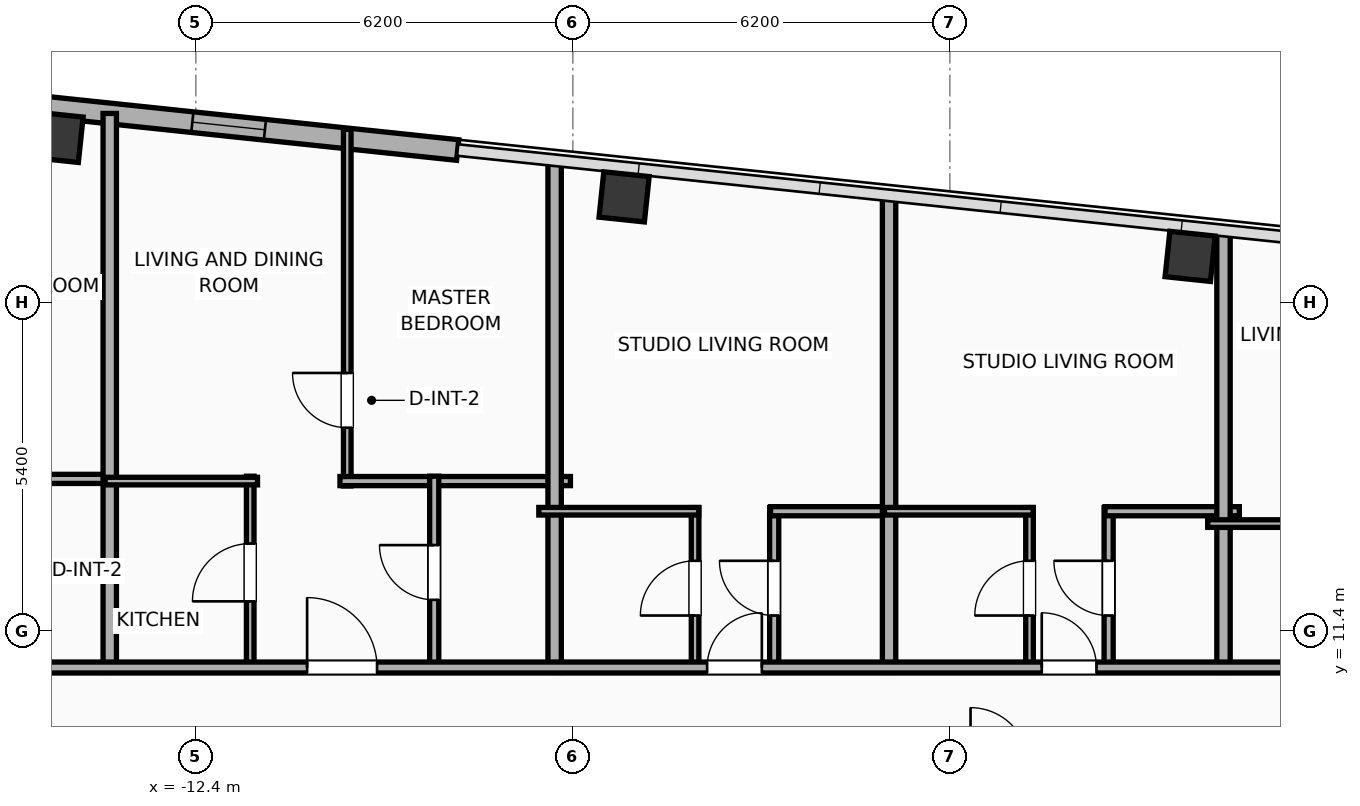
"""IFC4 building model, lengths in metres.
Left out: names, types, materials, properties, quantities, classifications, styles, units other than length and angle.
Written with IfcOpenShell. Run it as: python <this file> out.ifc"""

import sys

from ifc_helpers import new_model, si_unit, direction, frame, frame_2d, origin, origin_2d, place, context, subcontext, project, spatial, rectangle, hollow_rectangle, extrude, element, fill, save


model = new_model("IFC4")
c1 = context("Model", 3, precision=1e-05, world=origin(), true_north=direction((0.0, 1.0)))
c2 = subcontext(c1, "Body", "Model", "MODEL_VIEW")
j1 = project(units=[si_unit("LENGTHUNIT", "METRE"), si_unit("PLANEANGLEUNIT", "RADIAN")], contexts=[c1])
p1 = place(None, origin())
s1 = spatial("IfcSite", under=j1, at=p1, CompositionType="ELEMENT")
p2 = place(p1, origin())
s2 = spatial("IfcBuilding", under=s1, at=p2, CompositionType="ELEMENT")
p3 = place(p2, frame((0.0, 0.0, 275.6)))
s3 = spatial("IfcBuildingStorey", under=s2, at=p3, CompositionType="ELEMENT", Elevation=275.6)
for number, where, z_axis, x_axis in (
    (1, (3.952, 17.561, 0.0), (0.0, 0.0, 1.0), (0.995, -0.105, 0.0)),
    (2, (-5.357, 18.54, 0.0), (0.0, 0.0, 1.0), (0.995, -0.105, 0.0)),
    (3, (-14.666, 19.518, 0.0), (0.0, 0.0, 1.0), (0.995, -0.105, 0.0)),
):
    element("IfcColumn", number, at=place(p3, frame(where, z_axis=z_axis, x_axis=x_axis)), inside=s3, PredefinedType="COLUMN", context=c2, shape_type="SweptSolid", body=[
        extrude(hollow_rectangle(XDim=0.75, YDim=0.75, WallThickness=0.025, at=origin_2d()), origin(), (0.0, 0.0, 1.0), 3.9),
    ])
p4 = place(p3, frame((-23.908, 20.972, 0.0), z_axis=(0.0, 0.0, 1.0), x_axis=(0.994521594531, -0.104531325504, 0.0)))
e4 = element("IfcWall", 4, at=p4, inside=s3, PredefinedType="ELEMENTEDWALL", context=c2, shape_type="SweptSolid", body=[
    extrude(rectangle(XDim=15.901, YDim=0.34, at=frame_2d((7.95, 0.0))), origin(), (0.0, 0.0, 1.0), 3.65),
])
p5 = place(p4, frame((1.243, 0.0, 0.75)))
e5 = element("IfcOpeningElement", 5, at=p5, cuts=e4, PredefinedType="OPENING", context=c2, shape_type="SweptSolid", body=[
    extrude(rectangle(XDim=1.2, YDim=2.05, at=frame_2d((0.6, 1.025))), frame((0.0, 0.18, 0.0), z_axis=(0.0, -1.0, 0.0), x_axis=(1.0, 0.0, 0.0)), (0.0, 0.0, 1.0), 0.36),
])
p6 = place(p4, frame((4.157, 0.0, 0.75)))
e6 = element("IfcOpeningElement", 6, at=p6, cuts=e4, PredefinedType="OPENING", context=c2, shape_type="SweptSolid", body=[
    extrude(rectangle(XDim=1.2, YDim=2.05, at=frame_2d((0.6, 1.025))), frame((0.0, 0.18, 0.0), z_axis=(0.0, -1.0, 0.0), x_axis=(1.0, 0.0, 0.0)), (0.0, 0.0, 1.0), 0.36),
])
p7 = place(p4, frame((7.475, 0.0, 0.75)))
e7 = element("IfcOpeningElement", 7, at=p7, cuts=e4, PredefinedType="OPENING", context=c2, shape_type="SweptSolid", body=[
    extrude(rectangle(XDim=1.2, YDim=2.05, at=frame_2d((0.6, 1.025))), frame((0.0, 0.18, 0.0), z_axis=(0.0, -1.0, 0.0), x_axis=(1.0, 0.0, 0.0)), (0.0, 0.0, 1.0), 0.36),
])
p8 = place(p4, frame((11.513, 0.0, 0.75)))
e8 = element("IfcOpeningElement", 8, at=p8, cuts=e4, PredefinedType="OPENING", context=c2, shape_type="SweptSolid", body=[
    extrude(rectangle(XDim=1.2, YDim=2.05, at=frame_2d((0.6, 1.025))), frame((0.0, 0.18, 0.0), z_axis=(0.0, -1.0, 0.0), x_axis=(1.0, 0.0, 0.0)), (0.0, 0.0, 1.0), 0.36),
])
p9 = place(p3, frame((-17.346, 13.902, 0.0), z_axis=(0.0, 0.0, 1.0), x_axis=(1.0, 0.0, 0.0)))
e9 = element("IfcWall", 9, at=p9, inside=s3, PredefinedType="PLUMBINGWALL", context=c2, shape_type="SweptSolid", body=[
    extrude(rectangle(XDim=3.605, YDim=0.15, at=frame_2d((1.802, 0.0))), origin(), (0.0, 0.0, 1.0), 3.65),
])
p10 = place(p3, frame((-13.816, 10.72, 0.0), z_axis=(0.0, 0.0, 1.0), x_axis=(0.0, 1.0, 0.0)))
e10 = element("IfcWall", 10, at=p10, inside=s3, PredefinedType="PARTITIONING", context=c2, shape_type="SweptSolid", body=[
    extrude(rectangle(XDim=9.192, YDim=0.22, at=frame_2d((4.596, 0.0))), origin(), (0.0, 0.0, 1.0), 3.65),
])
p11 = place(p3, frame((-9.91, 13.786, 0.0), z_axis=(0.0, 0.0, 1.0), x_axis=(0.0, 1.0, 0.0)))
e11 = element("IfcWall", 11, at=p11, inside=s3, PredefinedType="PARTITIONING", context=c2, shape_type="SweptSolid", body=[
    extrude(rectangle(XDim=5.866, YDim=0.125, at=frame_2d((2.933, 0.0))), origin(), (0.0, 0.0, 1.0), 3.65),
])
p12 = place(p11, frame((0.958, 0.0, 0.0)))
e12 = element("IfcOpeningElement", 12, at=p12, cuts=e11, PredefinedType="OPENING", context=c2, shape_type="SweptSolid", body=[
    extrude(rectangle(XDim=0.9, YDim=2.05, at=frame_2d((0.45, 1.025))), frame((0.0, 0.073, 0.0), z_axis=(0.0, -1.0, 0.0), x_axis=(1.0, 0.0, 0.0)), (0.0, 0.0, 1.0), 0.145),
])
p13 = place(p3, frame((-10.03, 13.866, 0.0), z_axis=(0.0, 0.0, 1.0), x_axis=(1.0, 0.0, 0.0)))
e13 = element("IfcWall", 13, at=p13, inside=s3, PredefinedType="PLUMBINGWALL", context=c2, shape_type="SweptSolid", body=[
    extrude(rectangle(XDim=3.79, YDim=0.15, at=frame_2d((1.895, 0.0))), origin(), (0.0, 0.0, 1.0), 3.65),
])
p14 = place(p3, frame((-11.506, 10.78, 0.0), z_axis=(0.0, 0.0, 1.0), x_axis=(0.0, 1.0, 0.0)))
e14 = element("IfcWall", 14, at=p14, inside=s3, PredefinedType="PARTITIONING", context=c2, shape_type="SweptSolid", body=[
    extrude(rectangle(XDim=3.166, YDim=0.125, at=frame_2d((1.583, 0.0))), origin(), (0.0, 0.0, 1.0), 3.65),
])
p15 = place(p14, frame((1.108, 0.0, 0.0)))
e15 = element("IfcOpeningElement", 15, at=p15, cuts=e14, PredefinedType="OPENING", context=c2, shape_type="SweptSolid", body=[
    extrude(rectangle(XDim=0.95, YDim=2.05, at=frame_2d((0.475, 1.025))), frame((0.0, 0.073, 0.0), z_axis=(0.0, -1.0, 0.0), x_axis=(1.0, 0.0, 0.0)), (0.0, 0.0, 1.0), 0.145),
])
p16 = place(p3, frame((-13.891, 13.866, 0.0), z_axis=(0.0, 0.0, 1.0), x_axis=(1.0, 0.0, 0.0)))
e16 = element("IfcWall", 16, at=p16, inside=s3, PredefinedType="PARTITIONING", context=c2, shape_type="SweptSolid", body=[
    extrude(rectangle(XDim=2.505, YDim=0.125, at=frame_2d((1.252, 0.0))), origin(), (0.0, 0.0, 1.0), 3.65),
])
p17 = place(p3, frame((-8.48, 10.78, 0.0), z_axis=(0.0, 0.0, 1.0), x_axis=(0.0, 1.0, 0.0)))
e17 = element("IfcWall", 17, at=p17, inside=s3, PredefinedType="PLUMBINGWALL", context=c2, shape_type="SweptSolid", body=[
    extrude(rectangle(XDim=3.166, YDim=0.15, at=frame_2d((1.583, 0.0))), origin(), (0.0, 0.0, 1.0), 3.65),
])
p18 = place(p17, frame((1.133, 0.0, 0.0)))
e18 = element("IfcOpeningElement", 18, at=p18, cuts=e17, PredefinedType="OPENING", context=c2, shape_type="SweptSolid", body=[
    extrude(rectangle(XDim=0.9, YDim=2.05, at=frame_2d((0.45, 1.025))), frame((0.0, 0.085, 0.0), z_axis=(0.0, -1.0, 0.0), x_axis=(1.0, 0.0, 0.0)), (0.0, 0.0, 1.0), 0.17),
])
p19 = place(p3, frame((-6.5, 10.72, 0.0), z_axis=(0.0, 0.0, 1.0), x_axis=(0.0, 1.0, 0.0)))
e19 = element("IfcWall", 19, at=p19, inside=s3, PredefinedType="PARTITIONING", context=c2, shape_type="SweptSolid", body=[
    extrude(rectangle(XDim=8.423, YDim=0.22, at=frame_2d((4.211, 0.0))), origin(), (0.0, 0.0, 1.0), 3.65),
])
p20 = place(p3, frame((-4.19, 10.78, 0.0), z_axis=(0.0, 0.0, 1.0), x_axis=(0.0, 1.0, 0.0)))
e20 = element("IfcWall", 20, at=p20, inside=s3, PredefinedType="PARTITIONING", context=c2, shape_type="SweptSolid", body=[
    extrude(rectangle(XDim=2.65, YDim=0.125, at=frame_2d((1.325, 0.0))), origin(), (0.0, 0.0, 1.0), 3.65),
])
p21 = place(p20, frame((0.875, 0.0, 0.0)))
e21 = element("IfcOpeningElement", 21, at=p21, cuts=e20, PredefinedType="OPENING", context=c2, shape_type="SweptSolid", body=[
    extrude(rectangle(XDim=0.9, YDim=2.05, at=frame_2d((0.45, 1.025))), frame((0.0, 0.073, 0.0), z_axis=(0.0, -1.0, 0.0), x_axis=(1.0, 0.0, 0.0)), (0.0, 0.0, 1.0), 0.145),
])
p22 = place(p3, frame((-2.889, 10.78, 0.0), z_axis=(0.0, 0.0, 1.0), x_axis=(0.0, 1.0, 0.0)))
e22 = element("IfcWall", 22, at=p22, inside=s3, PredefinedType="PLUMBINGWALL", context=c2, shape_type="SweptSolid", body=[
    extrude(rectangle(XDim=2.65, YDim=0.15, at=frame_2d((1.325, 0.0))), origin(), (0.0, 0.0, 1.0), 3.65),
])
p23 = place(p22, frame((0.875, 0.0, 0.0)))
e23 = element("IfcOpeningElement", 23, at=p23, cuts=e22, PredefinedType="OPENING", context=c2, shape_type="SweptSolid", body=[
    extrude(rectangle(XDim=0.9, YDim=2.05, at=frame_2d((0.45, 1.025))), frame((0.0, 0.085, 0.0), z_axis=(0.0, -1.0, 0.0), x_axis=(1.0, 0.0, 0.0)), (0.0, 0.0, 1.0), 0.17),
])
p24 = place(p3, frame((-6.76, 13.37, 0.0), z_axis=(0.0, 0.0, 1.0), x_axis=(1.0, 0.0, 0.0)))
e24 = element("IfcWall", 24, at=p24, inside=s3, PredefinedType="PARTITIONING", context=c2, shape_type="SweptSolid", body=[
    extrude(rectangle(XDim=2.63, YDim=0.125, at=frame_2d((1.315, 0.0))), origin(), (0.0, 0.0, 1.0), 3.65),
])
p25 = place(p3, frame((-2.949, 13.37, 0.0), z_axis=(0.0, 0.0, 1.0), x_axis=(1.0, 0.0, 0.0)))
e25 = element("IfcWall", 25, at=p25, inside=s3, PredefinedType="PLUMBINGWALL", context=c2, shape_type="SweptSolid", body=[
    extrude(rectangle(XDim=2.024, YDim=0.15, at=frame_2d((1.012, 0.0))), origin(), (0.0, 0.0, 1.0), 3.65),
])
p26 = place(p3, frame((-1.0, 10.72, 0.0), z_axis=(0.0, 0.0, 1.0), x_axis=(0.0, 1.0, 0.0)))
e26 = element("IfcWall", 26, at=p26, inside=s3, PredefinedType="PARTITIONING", context=c2, shape_type="SweptSolid", body=[
    extrude(rectangle(XDim=7.844, YDim=0.22, at=frame_2d((3.922, 0.0))), origin(), (0.0, 0.0, 1.0), 3.65),
])
p27 = place(p3, frame((1.31, 10.78, 0.0), z_axis=(0.0, 0.0, 1.0), x_axis=(0.0, 1.0, 0.0)))
e27 = element("IfcWall", 27, at=p27, inside=s3, PredefinedType="PARTITIONING", context=c2, shape_type="SweptSolid", body=[
    extrude(rectangle(XDim=2.65, YDim=0.125, at=frame_2d((1.325, 0.0))), origin(), (0.0, 0.0, 1.0), 3.65),
])
p28 = place(p27, frame((0.875, 0.0, 0.0)))
e28 = element("IfcOpeningElement", 28, at=p28, cuts=e27, PredefinedType="OPENING", context=c2, shape_type="SweptSolid", body=[
    extrude(rectangle(XDim=0.9, YDim=2.05, at=frame_2d((0.45, 1.025))), frame((0.0, 0.073, 0.0), z_axis=(0.0, -1.0, 0.0), x_axis=(1.0, 0.0, 0.0)), (0.0, 0.0, 1.0), 0.145),
])
p29 = place(p3, frame((2.611, 10.78, 0.0), z_axis=(0.0, 0.0, 1.0), x_axis=(0.0, 1.0, 0.0)))
e29 = element("IfcWall", 29, at=p29, inside=s3, PredefinedType="PLUMBINGWALL", context=c2, shape_type="SweptSolid", body=[
    extrude(rectangle(XDim=2.65, YDim=0.15, at=frame_2d((1.325, 0.0))), origin(), (0.0, 0.0, 1.0), 3.65),
])
p30 = place(p29, frame((0.875, 0.0, 0.0)))
e30 = element("IfcOpeningElement", 30, at=p30, cuts=e29, PredefinedType="OPENING", context=c2, shape_type="SweptSolid", body=[
    extrude(rectangle(XDim=0.9, YDim=2.05, at=frame_2d((0.45, 1.025))), frame((0.0, 0.085, 0.0), z_axis=(0.0, -1.0, 0.0), x_axis=(1.0, 0.0, 0.0)), (0.0, 0.0, 1.0), 0.17),
])
p31 = place(p3, frame((-1.075, 13.37, 0.0), z_axis=(0.0, 0.0, 1.0), x_axis=(1.0, 0.0, 0.0)))
e31 = element("IfcWall", 31, at=p31, inside=s3, PredefinedType="PARTITIONING", context=c2, shape_type="SweptSolid", body=[
    extrude(rectangle(XDim=2.445, YDim=0.125, at=frame_2d((1.223, 0.0))), origin(), (0.0, 0.0, 1.0), 3.65),
])
p32 = place(p3, frame((2.551, 13.37, 0.0), z_axis=(0.0, 0.0, 1.0), x_axis=(1.0, 0.0, 0.0)))
e32 = element("IfcWall", 32, at=p32, inside=s3, PredefinedType="PLUMBINGWALL", context=c2, shape_type="SweptSolid", body=[
    extrude(rectangle(XDim=2.209, YDim=0.15, at=frame_2d((1.104, 0.0))), origin(), (0.0, 0.0, 1.0), 3.65),
])
p33 = place(p3, frame((4.5, 10.72, 0.0), z_axis=(0.0, 0.0, 1.0), x_axis=(0.0, 1.0, 0.0)))
e33 = element("IfcWall", 33, at=p33, inside=s3, PredefinedType="PARTITIONING", context=c2, shape_type="SweptSolid", body=[
    extrude(rectangle(XDim=7.266, YDim=0.22, at=frame_2d((3.633, 0.0))), origin(), (0.0, 0.0, 1.0), 3.65),
])
p34 = place(p3, frame((4.24, 13.167, 0.0), z_axis=(0.0, 0.0, 1.0), x_axis=(1.0, 0.0, 0.0)))
e34 = element("IfcWall", 34, at=p34, inside=s3, PredefinedType="PARTITIONING", context=c2, shape_type="SweptSolid", body=[
    extrude(rectangle(XDim=2.69, YDim=0.125, at=frame_2d((1.345, 0.0))), origin(), (0.0, 0.0, 1.0), 3.65),
])
p35 = place(p3, frame((-28.443, 10.8, 0.0), z_axis=(0.0, 0.0, 1.0), x_axis=(1.0, 0.0, 0.0)))
e35 = element("IfcWall", 35, at=p35, inside=s3, PredefinedType="PARTITIONING", context=c2, shape_type="SweptSolid", body=[
    extrude(rectangle(XDim=53.956, YDim=0.18, at=frame_2d((26.978, 0.0))), origin(), (0.0, 0.0, 1.0), 3.65),
])
p36 = place(p35, frame((3.213, 0.0, 0.0)))
e36 = element("IfcOpeningElement", 36, at=p36, cuts=e35, PredefinedType="OPENING", context=c2, shape_type="SweptSolid", body=[
    extrude(rectangle(XDim=1.15, YDim=2.05, at=frame_2d((0.575, 1.025))), frame((0.0, 0.1, 0.0), z_axis=(0.0, -1.0, 0.0), x_axis=(1.0, 0.0, 0.0)), (0.0, 0.0, 1.0), 0.2),
])
p37 = place(p35, frame((10.556, 0.0, 0.0)))
e37 = element("IfcOpeningElement", 37, at=p37, cuts=e35, PredefinedType="OPENING", context=c2, shape_type="SweptSolid", body=[
    extrude(rectangle(XDim=1.15, YDim=2.05, at=frame_2d((0.575, 1.025))), frame((0.0, 0.1, 0.0), z_axis=(0.0, -1.0, 0.0), x_axis=(1.0, 0.0, 0.0)), (0.0, 0.0, 1.0), 0.2),
])
p38 = place(p35, frame((17.872, 0.0, 0.0)))
e38 = element("IfcOpeningElement", 38, at=p38, cuts=e35, PredefinedType="OPENING", context=c2, shape_type="SweptSolid", body=[
    extrude(rectangle(XDim=1.15, YDim=2.05, at=frame_2d((0.575, 1.025))), frame((0.0, 0.1, 0.0), z_axis=(0.0, -1.0, 0.0), x_axis=(1.0, 0.0, 0.0)), (0.0, 0.0, 1.0), 0.2),
])
p39 = place(p35, frame((24.45, 0.0, 0.0)))
e39 = element("IfcOpeningElement", 39, at=p39, cuts=e35, PredefinedType="OPENING", context=c2, shape_type="SweptSolid", body=[
    extrude(rectangle(XDim=0.9, YDim=2.05, at=frame_2d((0.45, 1.025))), frame((0.0, 0.1, 0.0), z_axis=(0.0, -1.0, 0.0), x_axis=(1.0, 0.0, 0.0)), (0.0, 0.0, 1.0), 0.2),
])
p40 = place(p35, frame((29.954, 0.0, 0.0)))
e40 = element("IfcOpeningElement", 40, at=p40, cuts=e35, PredefinedType="OPENING", context=c2, shape_type="SweptSolid", body=[
    extrude(rectangle(XDim=0.9, YDim=2.05, at=frame_2d((0.45, 1.025))), frame((0.0, 0.1, 0.0), z_axis=(0.0, -1.0, 0.0), x_axis=(1.0, 0.0, 0.0)), (0.0, 0.0, 1.0), 0.2),
])
p41 = place(p35, frame((36.186, 0.0, 0.0)))
e41 = element("IfcOpeningElement", 41, at=p41, cuts=e35, PredefinedType="OPENING", context=c2, shape_type="SweptSolid", body=[
    extrude(rectangle(XDim=0.9, YDim=2.05, at=frame_2d((0.45, 1.025))), frame((0.0, 0.1, 0.0), z_axis=(0.0, -1.0, 0.0), x_axis=(1.0, 0.0, 0.0)), (0.0, 0.0, 1.0), 0.2),
])
p42 = place(p35, frame((43.249, 0.0, 0.0)))
e42 = element("IfcOpeningElement", 42, at=p42, cuts=e35, PredefinedType="OPENING", context=c2, shape_type="SweptSolid", body=[
    extrude(rectangle(XDim=0.9, YDim=2.05, at=frame_2d((0.45, 1.025))), frame((0.0, 0.1, 0.0), z_axis=(0.0, -1.0, 0.0), x_axis=(1.0, 0.0, 0.0)), (0.0, 0.0, 1.0), 0.2),
])
p43 = place(p35, frame((50.311, 0.0, 0.0)))
e43 = element("IfcOpeningElement", 43, at=p43, cuts=e35, PredefinedType="OPENING", context=c2, shape_type="SweptSolid", body=[
    extrude(rectangle(XDim=0.9, YDim=2.05, at=frame_2d((0.45, 1.025))), frame((0.0, 0.1, 0.0), z_axis=(0.0, -1.0, 0.0), x_axis=(1.0, 0.0, 0.0)), (0.0, 0.0, 1.0), 0.2),
])
p44 = place(p8, origin())
e44 = element("IfcWindow", 44, at=p44, inside=s3, PartitioningType="SINGLE_PANEL", PredefinedType="WINDOW", context=c2, shape_type="SweptSolid", body=[
    extrude(rectangle(XDim=1.2, YDim=2.05, at=frame_2d((0.6, 1.025))), frame((0.0, 0.03, 0.0), z_axis=(0.0, -1.0, 0.0), x_axis=(1.0, 0.0, 0.0)), (0.0, 0.0, 1.0), 0.06),
])
fill(e8, e44)
p45 = place(p12, origin())
e45 = element("IfcDoor", 45, at=p45, inside=s3, OperationType="SINGLE_SWING_RIGHT", PredefinedType="DOOR", context=c2, shape_type="SweptSolid", body=[
    extrude(rectangle(XDim=0.9, YDim=2.05, at=frame_2d((0.45, 1.025))), frame((0.0, 0.025, 0.0), z_axis=(0.0, -1.0, 0.0), x_axis=(1.0, 0.0, 0.0)), (0.0, 0.0, 1.0), 0.05),
])
fill(e12, e45)
p46 = place(p15, origin())
e46 = element("IfcDoor", 46, at=p46, inside=s3, OperationType="SINGLE_SWING_LEFT", PredefinedType="DOOR", context=c2, shape_type="SweptSolid", body=[
    extrude(rectangle(XDim=0.95, YDim=2.05, at=frame_2d((0.475, 1.025))), frame((0.0, 0.025, 0.0), z_axis=(0.0, -1.0, 0.0), x_axis=(1.0, 0.0, 0.0)), (0.0, 0.0, 1.0), 0.05),
])
fill(e15, e46)
p47 = place(p18, origin())
e47 = element("IfcDoor", 47, at=p47, inside=s3, OperationType="SINGLE_SWING_RIGHT", PredefinedType="DOOR", context=c2, shape_type="SweptSolid", body=[
    extrude(rectangle(XDim=0.9, YDim=2.05, at=frame_2d((0.45, 1.025))), frame((0.0, 0.025, 0.0), z_axis=(0.0, -1.0, 0.0), x_axis=(1.0, 0.0, 0.0)), (0.0, 0.0, 1.0), 0.05),
])
fill(e18, e47)
p48 = place(p21, origin())
e48 = element("IfcDoor", 48, at=p48, inside=s3, OperationType="SINGLE_SWING_LEFT", PredefinedType="DOOR", context=c2, shape_type="SweptSolid", body=[
    extrude(rectangle(XDim=0.9, YDim=2.05, at=frame_2d((0.45, 1.025))), frame((0.0, 0.025, 0.0), z_axis=(0.0, -1.0, 0.0), x_axis=(1.0, 0.0, 0.0)), (0.0, 0.0, 1.0), 0.05),
])
fill(e21, e48)
p49 = place(p23, origin())
e49 = element("IfcDoor", 49, at=p49, inside=s3, OperationType="SINGLE_SWING_RIGHT", PredefinedType="DOOR", context=c2, shape_type="SweptSolid", body=[
    extrude(rectangle(XDim=0.9, YDim=2.05, at=frame_2d((0.45, 1.025))), frame((0.0, 0.025, 0.0), z_axis=(0.0, -1.0, 0.0), x_axis=(1.0, 0.0, 0.0)), (0.0, 0.0, 1.0), 0.05),
])
fill(e23, e49)
p50 = place(p28, origin())
e50 = element("IfcDoor", 50, at=p50, inside=s3, OperationType="SINGLE_SWING_LEFT", PredefinedType="DOOR", context=c2, shape_type="SweptSolid", body=[
    extrude(rectangle(XDim=0.9, YDim=2.05, at=frame_2d((0.45, 1.025))), frame((0.0, 0.025, 0.0), z_axis=(0.0, -1.0, 0.0), x_axis=(1.0, 0.0, 0.0)), (0.0, 0.0, 1.0), 0.05),
])
fill(e28, e50)
p51 = place(p30, origin())
e51 = element("IfcDoor", 51, at=p51, inside=s3, OperationType="SINGLE_SWING_RIGHT", PredefinedType="DOOR", context=c2, shape_type="SweptSolid", body=[
    extrude(rectangle(XDim=0.9, YDim=2.05, at=frame_2d((0.45, 1.025))), frame((0.0, 0.025, 0.0), z_axis=(0.0, -1.0, 0.0), x_axis=(1.0, 0.0, 0.0)), (0.0, 0.0, 1.0), 0.05),
])
fill(e30, e51)
p52 = place(p38, origin())
e52 = element("IfcDoor", 52, at=p52, inside=s3, OperationType="SINGLE_SWING_LEFT", PredefinedType="DOOR", context=c2, shape_type="SweptSolid", body=[
    extrude(rectangle(XDim=1.15, YDim=2.05, at=frame_2d((0.575, 1.025))), frame((0.0, 0.025, 0.0), z_axis=(0.0, -1.0, 0.0), x_axis=(1.0, 0.0, 0.0)), (0.0, 0.0, 1.0), 0.05),
])
fill(e38, e52)
p53 = place(p39, origin())
e53 = element("IfcDoor", 53, at=p53, inside=s3, OperationType="SINGLE_SWING_RIGHT", PredefinedType="DOOR", context=c2, shape_type="SweptSolid", body=[
    extrude(rectangle(XDim=0.9, YDim=2.05, at=frame_2d((0.45, 1.025))), frame((0.0, 0.025, 0.0), z_axis=(0.0, -1.0, 0.0), x_axis=(1.0, 0.0, 0.0)), (0.0, 0.0, 1.0), 0.05),
])
fill(e39, e53)
p54 = place(p40, origin())
e54 = element("IfcDoor", 54, at=p54, inside=s3, OperationType="SINGLE_SWING_LEFT", PredefinedType="DOOR", context=c2, shape_type="SweptSolid", body=[
    extrude(rectangle(XDim=0.9, YDim=2.05, at=frame_2d((0.45, 1.025))), frame((0.0, 0.025, 0.0), z_axis=(0.0, -1.0, 0.0), x_axis=(1.0, 0.0, 0.0)), (0.0, 0.0, 1.0), 0.05),
])
fill(e40, e54)
save(model, sys.argv[1])
